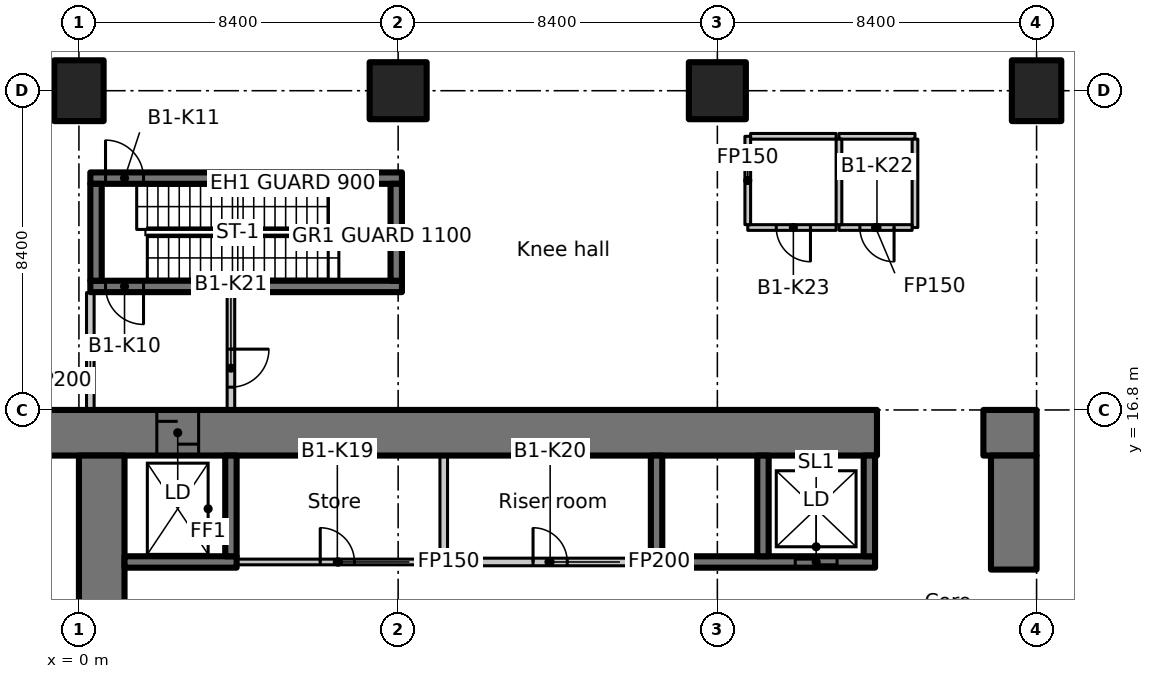
"""IFC4 building model, lengths in metres.
Left out: names, types, materials, properties, quantities, classifications, styles, units other than length and angle.
Written with IfcOpenShell. Run it as: python <this file> out.ifc"""

import sys

from ifc_helpers import new_model, si_unit, direction, frame, frame_2d, origin, origin_2d, place, context, subcontext, project, spatial, rectangle, extrude, element, fill, save


model = new_model("IFC4")
c1 = context("Model", 3, precision=1e-05, world=origin(), true_north=direction((0.0, 1.0)))
c2 = subcontext(c1, "Body", "Model", "MODEL_VIEW")
j1 = project(units=[si_unit("LENGTHUNIT", "METRE"), si_unit("PLANEANGLEUNIT", "RADIAN")], contexts=[c1])
p1 = place(None, origin())
s1 = spatial("IfcSite", under=j1, at=p1, CompositionType="ELEMENT")
p2 = place(p1, origin())
s2 = spatial("IfcBuilding", under=s1, at=p2, CompositionType="ELEMENT")
p3 = place(p2, frame((0.0, 0.0, -6.0)))
s3 = spatial("IfcBuildingStorey", under=s2, at=p3, CompositionType="ELEMENT", Elevation=-6.0)
p4 = place(p3, frame((0.0, 25.2, 0.0), z_axis=(0.0, 0.0, 1.0), x_axis=(1.0, 0.0, 0.0)))
e1 = element("IfcColumn", 1, at=p4, inside=s3, PredefinedType="COLUMN", context=c2, shape_type="SweptSolid", body=[
    extrude(rectangle(XDim=1.3, YDim=1.6, at=origin_2d()), origin(), (0.0, 0.0, 1.0), 5.6),
])
for number, where, z_axis, x_axis in (
    (2, (8.4, 25.2, 0.0), (0.0, 0.0, 1.0), (1.0, 0.0, 0.0)),
    (3, (16.8, 25.2, 0.0), (0.0, 0.0, 1.0), (1.0, 0.0, 0.0)),
):
    element("IfcColumn", number, at=place(p3, frame(where, z_axis=z_axis, x_axis=x_axis)), inside=s3, PredefinedType="COLUMN", context=c2, shape_type="SweptSolid", body=[
        extrude(rectangle(XDim=1.5, YDim=1.5, at=origin_2d()), origin(), (0.0, 0.0, 1.0), 5.6),
    ])
p5 = place(p3, frame((25.2, 25.2, 0.0), z_axis=(0.0, 0.0, 1.0), x_axis=(1.0, 0.0, 0.0)))
e4 = element("IfcColumn", 4, at=p5, inside=s3, PredefinedType="COLUMN", context=c2, shape_type="SweptSolid", body=[
    extrude(rectangle(XDim=1.3, YDim=1.6, at=origin_2d()), origin(), (0.0, 0.0, 1.0), 5.6),
])
p6 = place(p3, frame((-2.9, 16.2, 0.0), z_axis=(0.0, 0.0, 1.0), x_axis=(1.0, 0.0, 0.0)))
e5 = element("IfcWall", 5, at=p6, inside=s3, PredefinedType="SHEAR", context=c2, shape_type="SweptSolid", body=[
    extrude(rectangle(XDim=23.9, YDim=1.2, at=frame_2d((11.95, 0.0))), origin(), (0.0, 0.0, 1.0), 5.6),
])
p7 = place(p6, frame((4.95, 0.0, 0.0)))
e6 = element("IfcOpeningElement", 6, at=p7, cuts=e5, PredefinedType="OPENING", context=c2, shape_type="SweptSolid", body=[
    extrude(rectangle(XDim=1.1, YDim=2.3, at=frame_2d((0.55, 1.15))), frame((0.0, 0.61, 0.0), z_axis=(0.0, -1.0, 0.0), x_axis=(1.0, 0.0, 0.0)), (0.0, 0.0, 1.0), 1.22),
])
p8 = place(p3, frame((23.8, 16.2, 0.0), z_axis=(0.0, 0.0, 1.0), x_axis=(1.0, 0.0, 0.0)))
e7 = element("IfcWall", 7, at=p8, inside=s3, PredefinedType="SHEAR", context=c2, shape_type="SweptSolid", body=[
    extrude(rectangle(XDim=1.4, YDim=1.2, at=frame_2d((0.7, 0.0))), origin(), (0.0, 0.0, 1.0), 5.6),
])
p9 = place(p3, frame((0.6, 6.736, 0.0), z_axis=(0.0, 0.0, 1.0), x_axis=(0.0, 1.0, 0.0)))
e8 = element("IfcWall", 8, at=p9, inside=s3, PredefinedType="SHEAR", context=c2, shape_type="SweptSolid", body=[
    extrude(rectangle(XDim=8.864, YDim=1.2, at=frame_2d((4.432, 0.0))), origin(), (0.0, 0.0, 1.0), 5.6),
])
p10 = place(p3, frame((24.6, 12.6, 0.0), z_axis=(0.0, 0.0, 1.0), x_axis=(0.0, 1.0, 0.0)))
e9 = element("IfcWall", 9, at=p10, inside=s3, PredefinedType="SHEAR", context=c2, shape_type="SweptSolid", body=[
    extrude(rectangle(XDim=3.0, YDim=1.2, at=frame_2d((1.5, 0.0))), origin(), (0.0, 0.0, 1.0), 5.6),
])
p11 = place(p3, frame((1.2, 12.8, 0.0), z_axis=(0.0, 0.0, 1.0), x_axis=(1.0, 0.0, 0.0)))
e10 = element("IfcWall", 10, at=p11, inside=s3, PredefinedType="SHEAR", context=c2, shape_type="SweptSolid", body=[
    extrude(rectangle(XDim=2.95, YDim=0.3, at=frame_2d((1.475, 0.0))), origin(), (0.0, 0.0, 1.0), 5.6),
])
p12 = place(p3, frame((4.0, 12.95, 0.0), z_axis=(0.0, 0.0, 1.0), x_axis=(0.0, 1.0, 0.0)))
e11 = element("IfcWall", 11, at=p12, inside=s3, PredefinedType="SHEAR", context=c2, shape_type="SweptSolid", body=[
    extrude(rectangle(XDim=2.65, YDim=0.3, at=frame_2d((1.325, 0.0))), origin(), (0.0, 0.0, 1.0), 5.6),
])
p13 = place(p3, frame((15.05, 12.8, 0.0), z_axis=(0.0, 0.0, 1.0), x_axis=(1.0, 0.0, 0.0)))
e12 = element("IfcWall", 12, at=p13, inside=s3, PredefinedType="SHEAR", context=c2, shape_type="SweptSolid", body=[
    extrude(rectangle(XDim=5.9, YDim=0.3, at=frame_2d((2.95, 0.0))), origin(), (0.0, 0.0, 1.0), 5.6),
])
p14 = place(p13, frame((3.8, 0.0, 0.0)))
e13 = element("IfcOpeningElement", 13, at=p14, cuts=e12, PredefinedType="OPENING", context=c2, shape_type="SweptSolid", body=[
    extrude(rectangle(XDim=1.1, YDim=2.3, at=frame_2d((0.55, 1.15))), frame((0.0, 0.16, 0.0), z_axis=(0.0, -1.0, 0.0), x_axis=(1.0, 0.0, 0.0)), (0.0, 0.0, 1.0), 0.32),
])
for number, where, z_axis, x_axis in (
    (14, (15.2, 12.95, 0.0), (0.0, 0.0, 1.0), (0.0, 1.0, 0.0)),
    (15, (18.0, 12.95, 0.0), (0.0, 0.0, 1.0), (0.0, 1.0, 0.0)),
    (16, (20.8, 12.95, 0.0), (0.0, 0.0, 1.0), (0.0, 1.0, 0.0)),
):
    element("IfcWall", number, at=place(p3, frame(where, z_axis=z_axis, x_axis=x_axis)), inside=s3, PredefinedType="SHEAR", context=c2, shape_type="SweptSolid", body=[
        extrude(rectangle(XDim=2.65, YDim=0.3, at=frame_2d((1.325, 0.0))), origin(), (0.0, 0.0, 1.0), 5.6),
    ])
p15 = place(p3, frame((8.5, 20.05, 0.0), z_axis=(0.0, 0.0, 1.0), x_axis=(-1.0, 0.0, 0.0)))
e17 = element("IfcWall", 17, at=p15, inside=s3, PredefinedType="SHEAR", context=c2, shape_type="SweptSolid", body=[
    extrude(rectangle(XDim=8.2, YDim=0.3, at=frame_2d((4.1, 0.0))), origin(), (0.0, 0.0, 1.0), 5.6),
])
p16 = place(p15, frame((6.8, 0.0, 0.0)))
e18 = element("IfcOpeningElement", 18, at=p16, cuts=e17, PredefinedType="OPENING", context=c2, shape_type="SweptSolid", body=[
    extrude(rectangle(XDim=1.0, YDim=2.1, at=frame_2d((0.5, 1.05))), frame((0.0, 0.16, 0.0), z_axis=(0.0, -1.0, 0.0), x_axis=(1.0, 0.0, 0.0)), (0.0, 0.0, 1.0), 0.32),
])
p17 = place(p3, frame((0.3, 22.9, 0.0), z_axis=(0.0, 0.0, 1.0), x_axis=(1.0, 0.0, 0.0)))
e19 = element("IfcWall", 19, at=p17, inside=s3, PredefinedType="SHEAR", context=c2, shape_type="SweptSolid", body=[
    extrude(rectangle(XDim=8.2, YDim=0.3, at=frame_2d((4.1, 0.0))), origin(), (0.0, 0.0, 1.0), 5.6),
])
p18 = place(p17, frame((0.4, 0.0, 0.0)))
e20 = element("IfcOpeningElement", 20, at=p18, cuts=e19, PredefinedType="OPENING", context=c2, shape_type="SweptSolid", body=[
    extrude(rectangle(XDim=1.0, YDim=2.1, at=frame_2d((0.5, 1.05))), frame((0.0, 0.16, 0.0), z_axis=(0.0, -1.0, 0.0), x_axis=(1.0, 0.0, 0.0)), (0.0, 0.0, 1.0), 0.32),
])
for number, where, z_axis, x_axis in (
    (21, (0.45, 20.2, 0.0), (0.0, 0.0, 1.0), (0.0, 1.0, 0.0)),
    (22, (8.35, 20.2, 0.0), (0.0, 0.0, 1.0), (0.0, 1.0, 0.0)),
):
    element("IfcWall", number, at=place(p3, frame(where, z_axis=z_axis, x_axis=x_axis)), inside=s3, PredefinedType="SHEAR", context=c2, shape_type="SweptSolid", body=[
        extrude(rectangle(XDim=2.55, YDim=0.3, at=frame_2d((1.275, 0.0))), origin(), (0.0, 0.0, 1.0), 5.6),
    ])
p19 = place(p3, frame((0.3, 16.812, 0.0), z_axis=(0.0, 0.0, 1.0), x_axis=(0.0, 1.0, 0.0)))
e23 = element("IfcWall", 23, at=p19, inside=s3, PredefinedType="PARTITIONING", context=c2, shape_type="SweptSolid", body=[
    extrude(rectangle(XDim=3.076, YDim=0.2, at=frame_2d((1.538, 0.0))), origin(), (0.0, 0.0, 1.0), 5.6),
])
p20 = place(p3, frame((4.0, 19.888, 0.0), z_axis=(0.0, 0.0, 1.0), x_axis=(0.0, -1.0, 0.0)))
e24 = element("IfcWall", 24, at=p20, inside=s3, PredefinedType="PARTITIONING", context=c2, shape_type="SweptSolid", body=[
    extrude(rectangle(XDim=3.076, YDim=0.2, at=frame_2d((1.538, 0.0))), origin(), (0.0, 0.0, 1.0), 5.6),
])
p21 = place(p20, frame((1.488, 0.0, 0.0)))
e25 = element("IfcOpeningElement", 25, at=p21, cuts=e24, PredefinedType="OPENING", context=c2, shape_type="SweptSolid", body=[
    extrude(rectangle(XDim=1.0, YDim=2.1, at=frame_2d((0.5, 1.05))), frame((0.0, 0.11, 0.0), z_axis=(0.0, -1.0, 0.0), x_axis=(1.0, 0.0, 0.0)), (0.0, 0.0, 1.0), 0.22),
])
p22 = place(p3, frame((9.6, 15.588, 0.0), z_axis=(0.0, 0.0, 1.0), x_axis=(0.0, -1.0, 0.0)))
e26 = element("IfcWall", 26, at=p22, inside=s3, PredefinedType="PARTITIONING", context=c2, shape_type="SweptSolid", body=[
    extrude(rectangle(XDim=2.788, YDim=0.2, at=frame_2d((1.394, 0.0))), origin(), (0.0, 0.0, 1.0), 5.6),
])
p23 = place(p3, frame((9.7, 12.8, 0.0), z_axis=(0.0, 0.0, 1.0), x_axis=(1.0, 0.0, 0.0)))
e27 = element("IfcWall", 27, at=p23, inside=s3, PredefinedType="PARTITIONING", context=c2, shape_type="SweptSolid", body=[
    extrude(rectangle(XDim=5.338, YDim=0.2, at=frame_2d((2.669, 0.0))), origin(), (0.0, 0.0, 1.0), 5.6),
])
p24 = place(p23, frame((2.25, 0.0, 0.0)))
e28 = element("IfcOpeningElement", 28, at=p24, cuts=e27, PredefinedType="OPENING", context=c2, shape_type="SweptSolid", body=[
    extrude(rectangle(XDim=0.9, YDim=2.1, at=frame_2d((0.45, 1.05))), frame((0.0, 0.11, 0.0), z_axis=(0.0, -1.0, 0.0), x_axis=(1.0, 0.0, 0.0)), (0.0, 0.0, 1.0), 0.22),
])
p25 = place(p3, frame((4.162, 12.8, 0.0), z_axis=(0.0, 0.0, 1.0), x_axis=(1.0, 0.0, 0.0)))
e29 = element("IfcWall", 29, at=p25, inside=s3, PredefinedType="PARTITIONING", context=c2, shape_type="SweptSolid", body=[
    extrude(rectangle(XDim=5.338, YDim=0.15, at=frame_2d((2.669, 0.0))), origin(), (0.0, 0.0, 1.0), 5.6),
])
p26 = place(p25, frame((2.188, 0.0, 0.0)))
e30 = element("IfcOpeningElement", 30, at=p26, cuts=e29, PredefinedType="OPENING", context=c2, shape_type="SweptSolid", body=[
    extrude(rectangle(XDim=0.9, YDim=2.1, at=frame_2d((0.45, 1.05))), frame((0.0, 0.085, 0.0), z_axis=(0.0, -1.0, 0.0), x_axis=(1.0, 0.0, 0.0)), (0.0, 0.0, 1.0), 0.17),
])
p27 = place(p3, frame((20.0, 24.0, 0.0), z_axis=(0.0, 0.0, 1.0), x_axis=(1.0, 0.0, 0.0)))
e31 = element("IfcWall", 31, at=p27, inside=s3, PredefinedType="PARTITIONING", context=c2, shape_type="SweptSolid", body=[
    extrude(rectangle(XDim=2.0, YDim=0.15, at=frame_2d((1.0, 0.0))), origin(), (0.0, 0.0, 1.0), 5.6),
])
p28 = place(p3, frame((22.0, 23.925, 0.0), z_axis=(0.0, 0.0, 1.0), x_axis=(0.0, -1.0, 0.0)))
e32 = element("IfcWall", 32, at=p28, inside=s3, PredefinedType="PARTITIONING", context=c2, shape_type="SweptSolid", body=[
    extrude(rectangle(XDim=2.325, YDim=0.15, at=frame_2d((1.163, 0.0))), origin(), (0.0, 0.0, 1.0), 5.6),
])
p29 = place(p3, frame((21.925, 21.6, 0.0), z_axis=(0.0, 0.0, 1.0), x_axis=(-1.0, 0.0, 0.0)))
e33 = element("IfcWall", 33, at=p29, inside=s3, PredefinedType="PARTITIONING", context=c2, shape_type="SweptSolid", body=[
    extrude(rectangle(XDim=1.925, YDim=0.15, at=frame_2d((0.962, 0.0))), origin(), (0.0, 0.0, 1.0), 5.6),
])
p30 = place(p29, frame((0.475, 0.0, 0.0)))
e34 = element("IfcOpeningElement", 34, at=p30, cuts=e33, PredefinedType="OPENING", context=c2, shape_type="SweptSolid", body=[
    extrude(rectangle(XDim=0.9, YDim=2.1, at=frame_2d((0.45, 1.05))), frame((0.0, 0.085, 0.0), z_axis=(0.0, -1.0, 0.0), x_axis=(1.0, 0.0, 0.0)), (0.0, 0.0, 1.0), 0.17),
])
p31 = place(p3, frame((20.0, 21.675, 0.0), z_axis=(0.0, 0.0, 1.0), x_axis=(0.0, 1.0, 0.0)))
e35 = element("IfcWall", 35, at=p31, inside=s3, PredefinedType="PARTITIONING", context=c2, shape_type="SweptSolid", body=[
    extrude(rectangle(XDim=2.25, YDim=0.15, at=frame_2d((1.125, 0.0))), origin(), (0.0, 0.0, 1.0), 5.6),
])
p32 = place(p3, frame((19.925, 21.6, 0.0), z_axis=(0.0, 0.0, 1.0), x_axis=(-1.0, 0.0, 0.0)))
e36 = element("IfcWall", 36, at=p32, inside=s3, PredefinedType="PARTITIONING", context=c2, shape_type="SweptSolid", body=[
    extrude(rectangle(XDim=2.325, YDim=0.15, at=frame_2d((1.163, 0.0))), origin(), (0.0, 0.0, 1.0), 5.6),
])
p33 = place(p32, frame((0.675, 0.0, 0.0)))
e37 = element("IfcOpeningElement", 37, at=p33, cuts=e36, PredefinedType="OPENING", context=c2, shape_type="SweptSolid", body=[
    extrude(rectangle(XDim=0.9, YDim=2.1, at=frame_2d((0.45, 1.05))), frame((0.0, 0.085, 0.0), z_axis=(0.0, -1.0, 0.0), x_axis=(1.0, 0.0, 0.0)), (0.0, 0.0, 1.0), 0.17),
])
p34 = place(p3, frame((17.6, 21.675, 0.0), z_axis=(0.0, 0.0, 1.0), x_axis=(0.0, 1.0, 0.0)))
e38 = element("IfcWall", 38, at=p34, inside=s3, PredefinedType="PARTITIONING", context=c2, shape_type="SweptSolid", body=[
    extrude(rectangle(XDim=2.325, YDim=0.15, at=frame_2d((1.163, 0.0))), origin(), (0.0, 0.0, 1.0), 5.6),
])
p35 = place(p3, frame((17.675, 24.0, 0.0), z_axis=(0.0, 0.0, 1.0), x_axis=(1.0, 0.0, 0.0)))
e39 = element("IfcWall", 39, at=p35, inside=s3, PredefinedType="PARTITIONING", context=c2, shape_type="SweptSolid", body=[
    extrude(rectangle(XDim=2.25, YDim=0.15, at=frame_2d((1.125, 0.0))), origin(), (0.0, 0.0, 1.0), 5.6),
])
p36 = place(p7, origin())
e40 = element("IfcDoor", 40, at=p36, inside=s3, OperationType="SLIDING_TO_LEFT", PredefinedType="DOOR", context=c2, shape_type="SweptSolid", body=[
    extrude(rectangle(XDim=1.1, YDim=2.3, at=frame_2d((0.55, 1.15))), frame((0.0, 0.025, 0.0), z_axis=(0.0, -1.0, 0.0), x_axis=(1.0, 0.0, 0.0)), (0.0, 0.0, 1.0), 0.05),
])
fill(e6, e40)
p37 = place(p14, origin())
e41 = element("IfcDoor", 41, at=p37, inside=s3, OperationType="SLIDING_TO_LEFT", PredefinedType="DOOR", context=c2, shape_type="SweptSolid", body=[
    extrude(rectangle(XDim=1.1, YDim=2.3, at=frame_2d((0.55, 1.15))), frame((0.0, 0.025, 0.0), z_axis=(0.0, -1.0, 0.0), x_axis=(1.0, 0.0, 0.0)), (0.0, 0.0, 1.0), 0.05),
])
fill(e13, e41)
p38 = place(p16, origin())
e42 = element("IfcDoor", 42, at=p38, inside=s3, OperationType="SINGLE_SWING_RIGHT", PredefinedType="DOOR", context=c2, shape_type="SweptSolid", body=[
    extrude(rectangle(XDim=1.0, YDim=2.1, at=frame_2d((0.5, 1.05))), frame((0.0, 0.025, 0.0), z_axis=(0.0, -1.0, 0.0), x_axis=(1.0, 0.0, 0.0)), (0.0, 0.0, 1.0), 0.05),
])
fill(e18, e42)
p39 = place(p18, origin())
e43 = element("IfcDoor", 43, at=p39, inside=s3, OperationType="SINGLE_SWING_LEFT", PredefinedType="DOOR", context=c2, shape_type="SweptSolid", body=[
    extrude(rectangle(XDim=1.0, YDim=2.1, at=frame_2d((0.5, 1.05))), frame((0.0, 0.025, 0.0), z_axis=(0.0, -1.0, 0.0), x_axis=(1.0, 0.0, 0.0)), (0.0, 0.0, 1.0), 0.05),
])
fill(e20, e43)
p40 = place(p26, origin())
e44 = element("IfcDoor", 44, at=p40, inside=s3, OperationType="SINGLE_SWING_LEFT", PredefinedType="DOOR", context=c2, shape_type="SweptSolid", body=[
    extrude(rectangle(XDim=0.9, YDim=2.1, at=frame_2d((0.45, 1.05))), frame((0.0, 0.025, 0.0), z_axis=(0.0, -1.0, 0.0), x_axis=(1.0, 0.0, 0.0)), (0.0, 0.0, 1.0), 0.05),
])
fill(e30, e44)
p41 = place(p24, origin())
e45 = element("IfcDoor", 45, at=p41, inside=s3, OperationType="SINGLE_SWING_RIGHT", PredefinedType="DOOR", context=c2, shape_type="SweptSolid", body=[
    extrude(rectangle(XDim=0.9, YDim=2.1, at=frame_2d((0.45, 1.05))), frame((0.0, 0.025, 0.0), z_axis=(0.0, -1.0, 0.0), x_axis=(1.0, 0.0, 0.0)), (0.0, 0.0, 1.0), 0.05),
])
fill(e28, e45)
p42 = place(p21, origin())
e46 = element("IfcDoor", 46, at=p42, inside=s3, OperationType="SINGLE_SWING_LEFT", PredefinedType="DOOR", context=c2, shape_type="SweptSolid", body=[
    extrude(rectangle(XDim=1.0, YDim=2.1, at=frame_2d((0.5, 1.05))), frame((0.0, 0.025, 0.0), z_axis=(0.0, -1.0, 0.0), x_axis=(1.0, 0.0, 0.0)), (0.0, 0.0, 1.0), 0.05),
])
fill(e25, e46)
p43 = place(p30, origin())
e47 = element("IfcDoor", 47, at=p43, inside=s3, OperationType="SINGLE_SWING_RIGHT", PredefinedType="DOOR", context=c2, shape_type="SweptSolid", body=[
    extrude(rectangle(XDim=0.9, YDim=2.1, at=frame_2d((0.45, 1.05))), frame((0.0, 0.025, 0.0), z_axis=(0.0, -1.0, 0.0), x_axis=(1.0, 0.0, 0.0)), (0.0, 0.0, 1.0), 0.05),
])
fill(e34, e47)
p44 = place(p33, origin())
e48 = element("IfcDoor", 48, at=p44, inside=s3, OperationType="SINGLE_SWING_LEFT", PredefinedType="DOOR", context=c2, shape_type="SweptSolid", body=[
    extrude(rectangle(XDim=0.9, YDim=2.1, at=frame_2d((0.45, 1.05))), frame((0.0, 0.025, 0.0), z_axis=(0.0, -1.0, 0.0), x_axis=(1.0, 0.0, 0.0)), (0.0, 0.0, 1.0), 0.05),
])
fill(e37, e48)
save(model, sys.argv[1])
